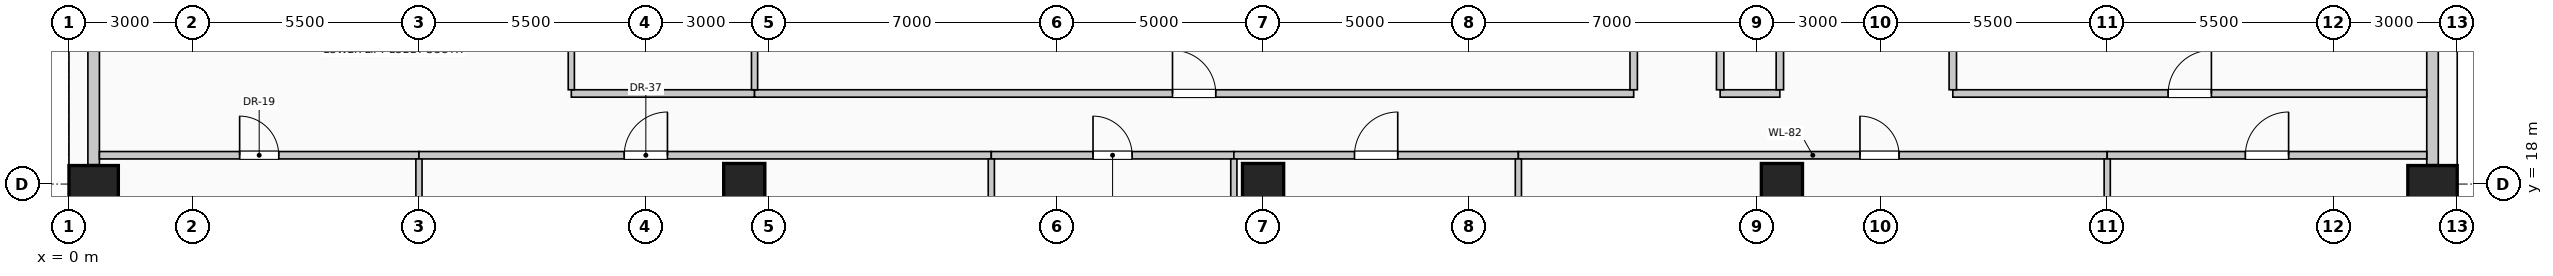
"""IFC4 building model, lengths in metres.
Left out: names, types, materials, properties, quantities, classifications, styles, units other than length and angle.
Written with IfcOpenShell. Run it as: python <this file> out.ifc"""

import sys

from ifc_helpers import new_model, si_unit, direction, frame, frame_2d, origin, origin_2d, place, context, subcontext, project, spatial, rectangle, circle, extrude, element, fill, save


model = new_model("IFC4")
c1 = context("Model", 3, precision=1e-05, world=origin(), true_north=direction((0.0, 1.0)))
c2 = subcontext(c1, "Body", "Model", "MODEL_VIEW")
j1 = project(units=[si_unit("LENGTHUNIT", "METRE"), si_unit("PLANEANGLEUNIT", "RADIAN")], contexts=[c1])
p1 = place(None, origin())
s1 = spatial("IfcSite", under=j1, at=p1, CompositionType="ELEMENT")
p2 = place(p1, origin())
s2 = spatial("IfcBuilding", under=s1, at=p2, CompositionType="ELEMENT")
p3 = place(p2, frame((0.0, 0.0, 70.6)))
s3 = spatial("IfcBuildingStorey", under=s2, at=p3, CompositionType="ELEMENT", Elevation=70.6)
for number, where, z_axis, x_axis in (
    (1, (0.6, 18.0, 0.0), (0.0, 0.0, 1.0), (0.0, 1.0, 0.0)),
    (2, (57.4, 18.0, 0.0), (0.0, 0.0, 1.0), (0.0, 1.0, 0.0)),
):
    element("IfcColumn", number, at=place(p3, frame(where, z_axis=z_axis, x_axis=x_axis)), inside=s3, PredefinedType="COLUMN", context=c2, shape_type="SweptSolid", body=[
        extrude(rectangle(XDim=0.9, YDim=1.2, at=origin_2d()), origin(), (0.0, 0.0, 1.0), 4.0),
    ])
for number, where, z_axis, x_axis in (
    (3, (16.4, 18.0, 0.0), (0.0, 0.0, 1.0), (1.0, 0.0, 0.0)),
    (4, (29.0, 18.0, 0.0), (0.0, 0.0, 1.0), (1.0, 0.0, 0.0)),
    (5, (41.6, 18.0, 0.0), (0.0, 0.0, 1.0), (1.0, 0.0, 0.0)),
):
    element("IfcColumn", number, at=place(p3, frame(where, z_axis=z_axis, x_axis=x_axis)), inside=s3, PredefinedType="COLUMN", context=c2, shape_type="SweptSolid", body=[
        extrude(circle(Radius=0.5, at=origin_2d()), origin(), (0.0, 0.0, 1.0), 4.0),
    ])
for number, where, z_axis, x_axis in (
    (6, (0.6, 18.47, 0.0), (0.0, 0.0, 1.0), (0.0, 1.0, 0.0)),
    (7, (57.4, 25.53, 0.0), (0.0, 0.0, 1.0), (0.0, -1.0, 0.0)),
):
    element("IfcWall", number, at=place(p3, frame(where, z_axis=z_axis, x_axis=x_axis)), inside=s3, PredefinedType="SOLIDWALL", context=c2, shape_type="SweptSolid", body=[
        extrude(rectangle(XDim=7.06, YDim=0.28, at=frame_2d((3.53, 0.0))), origin(), (0.0, 0.0, 1.0), 2.85),
    ])
p4 = place(p3, frame((0.74, 18.7, 0.0), z_axis=(0.0, 0.0, 1.0), x_axis=(1.0, 0.0, 0.0)))
e8 = element("IfcWall", 8, at=p4, inside=s3, PredefinedType="PARTITIONING", context=c2, shape_type="SweptSolid", body=[
    extrude(rectangle(XDim=7.76, YDim=0.18, at=frame_2d((3.88, 0.0))), origin(), (0.0, 0.0, 1.0), 3.7),
])
p5 = place(p4, frame((3.405, 0.0, 0.0)))
e9 = element("IfcOpeningElement", 9, at=p5, cuts=e8, PredefinedType="OPENING", context=c2, shape_type="SweptSolid", body=[
    extrude(rectangle(XDim=0.95, YDim=2.15, at=frame_2d((0.475, 1.075))), frame((0.0, 0.1, 0.0), z_axis=(0.0, -1.0, 0.0), x_axis=(1.0, 0.0, 0.0)), (0.0, 0.0, 1.0), 0.2),
])
p6 = place(p3, frame((8.5, 18.7, 0.0), z_axis=(0.0, 0.0, 1.0), x_axis=(1.0, 0.0, 0.0)))
e10 = element("IfcWall", 10, at=p6, inside=s3, PredefinedType="PARTITIONING", context=c2, shape_type="SweptSolid", body=[
    extrude(rectangle(XDim=13.9, YDim=0.18, at=frame_2d((6.95, 0.0))), origin(), (0.0, 0.0, 1.0), 3.7),
])
p7 = place(p6, frame((4.985, 0.0, 0.0)))
e11 = element("IfcOpeningElement", 11, at=p7, cuts=e10, PredefinedType="OPENING", context=c2, shape_type="SweptSolid", body=[
    extrude(rectangle(XDim=1.05, YDim=2.15, at=frame_2d((0.525, 1.075))), frame((0.0, 0.1, 0.0), z_axis=(0.0, -1.0, 0.0), x_axis=(1.0, 0.0, 0.0)), (0.0, 0.0, 1.0), 0.2),
])
p8 = place(p3, frame((22.4, 18.7, 0.0), z_axis=(0.0, 0.0, 1.0), x_axis=(1.0, 0.0, 0.0)))
e12 = element("IfcWall", 12, at=p8, inside=s3, PredefinedType="PARTITIONING", context=c2, shape_type="SweptSolid", body=[
    extrude(rectangle(XDim=5.89, YDim=0.18, at=frame_2d((2.945, 0.0))), origin(), (0.0, 0.0, 1.0), 3.7),
])
p9 = place(p8, frame((2.47, 0.0, 0.0)))
e13 = element("IfcOpeningElement", 13, at=p9, cuts=e12, PredefinedType="OPENING", context=c2, shape_type="SweptSolid", body=[
    extrude(rectangle(XDim=0.95, YDim=2.15, at=frame_2d((0.475, 1.075))), frame((0.0, 0.1, 0.0), z_axis=(0.0, -1.0, 0.0), x_axis=(1.0, 0.0, 0.0)), (0.0, 0.0, 1.0), 0.2),
])
p10 = place(p3, frame((28.29, 18.7, 0.0), z_axis=(0.0, 0.0, 1.0), x_axis=(1.0, 0.0, 0.0)))
e14 = element("IfcWall", 14, at=p10, inside=s3, PredefinedType="PARTITIONING", context=c2, shape_type="SweptSolid", body=[
    extrude(rectangle(XDim=6.91, YDim=0.18, at=frame_2d((3.455, 0.0))), origin(), (0.0, 0.0, 1.0), 3.7),
])
p11 = place(p10, frame((2.93, 0.0, 0.0)))
e15 = element("IfcOpeningElement", 15, at=p11, cuts=e14, PredefinedType="OPENING", context=c2, shape_type="SweptSolid", body=[
    extrude(rectangle(XDim=1.05, YDim=2.15, at=frame_2d((0.525, 1.075))), frame((0.0, 0.1, 0.0), z_axis=(0.0, -1.0, 0.0), x_axis=(1.0, 0.0, 0.0)), (0.0, 0.0, 1.0), 0.2),
])
p12 = place(p3, frame((35.2, 18.7, 0.0), z_axis=(0.0, 0.0, 1.0), x_axis=(1.0, 0.0, 0.0)))
e16 = element("IfcWall", 16, at=p12, inside=s3, PredefinedType="PARTITIONING", context=c2, shape_type="SweptSolid", body=[
    extrude(rectangle(XDim=14.3, YDim=0.18, at=frame_2d((7.15, 0.0))), origin(), (0.0, 0.0, 1.0), 3.7),
])
p13 = place(p12, frame((8.295, 0.0, 0.0)))
e17 = element("IfcOpeningElement", 17, at=p13, cuts=e16, PredefinedType="OPENING", context=c2, shape_type="SweptSolid", body=[
    extrude(rectangle(XDim=0.95, YDim=2.15, at=frame_2d((0.475, 1.075))), frame((0.0, 0.1, 0.0), z_axis=(0.0, -1.0, 0.0), x_axis=(1.0, 0.0, 0.0)), (0.0, 0.0, 1.0), 0.2),
])
p14 = place(p3, frame((49.5, 18.7, 0.0), z_axis=(0.0, 0.0, 1.0), x_axis=(1.0, 0.0, 0.0)))
e18 = element("IfcWall", 18, at=p14, inside=s3, PredefinedType="PARTITIONING", context=c2, shape_type="SweptSolid", body=[
    extrude(rectangle(XDim=7.76, YDim=0.18, at=frame_2d((3.88, 0.0))), origin(), (0.0, 0.0, 1.0), 3.7),
])
p15 = place(p14, frame((3.355, 0.0, 0.0)))
e19 = element("IfcOpeningElement", 19, at=p15, cuts=e18, PredefinedType="OPENING", context=c2, shape_type="SweptSolid", body=[
    extrude(rectangle(XDim=1.05, YDim=2.15, at=frame_2d((0.525, 1.075))), frame((0.0, 0.1, 0.0), z_axis=(0.0, -1.0, 0.0), x_axis=(1.0, 0.0, 0.0)), (0.0, 0.0, 1.0), 0.2),
])
p16 = place(p3, frame((12.2, 20.2, 0.0), z_axis=(0.0, 0.0, 1.0), x_axis=(1.0, 0.0, 0.0)))
e20 = element("IfcWall", 20, at=p16, inside=s3, PredefinedType="PARTITIONING", context=c2, shape_type="SweptSolid", body=[
    extrude(rectangle(XDim=4.45, YDim=0.18, at=frame_2d((2.225, 0.0))), origin(), (0.0, 0.0, 1.0), 3.7),
])
p17 = place(p3, frame((16.65, 20.2, 0.0), z_axis=(0.0, 0.0, 1.0), x_axis=(1.0, 0.0, 0.0)))
e21 = element("IfcWall", 21, at=p17, inside=s3, PredefinedType="PARTITIONING", context=c2, shape_type="SweptSolid", body=[
    extrude(rectangle(XDim=21.35, YDim=0.18, at=frame_2d((10.675, 0.0))), origin(), (0.0, 0.0, 1.0), 3.7),
])
p18 = place(p17, frame((10.15, 0.0, 0.0)))
e22 = element("IfcOpeningElement", 22, at=p18, cuts=e21, PredefinedType="OPENING", context=c2, shape_type="SweptSolid", body=[
    extrude(rectangle(XDim=1.05, YDim=2.15, at=frame_2d((0.525, 1.075))), frame((0.0, 0.1, 0.0), z_axis=(0.0, -1.0, 0.0), x_axis=(1.0, 0.0, 0.0)), (0.0, 0.0, 1.0), 0.2),
])
p19 = place(p3, frame((40.1, 20.2, 0.0), z_axis=(0.0, 0.0, 1.0), x_axis=(1.0, 0.0, 0.0)))
e23 = element("IfcWall", 23, at=p19, inside=s3, PredefinedType="PARTITIONING", context=c2, shape_type="SweptSolid", body=[
    extrude(rectangle(XDim=1.45, YDim=0.18, at=frame_2d((0.725, 0.0))), origin(), (0.0, 0.0, 1.0), 3.7),
])
p20 = place(p3, frame((45.75, 20.2, 0.0), z_axis=(0.0, 0.0, 1.0), x_axis=(1.0, 0.0, 0.0)))
e24 = element("IfcWall", 24, at=p20, inside=s3, PredefinedType="PARTITIONING", context=c2, shape_type="SweptSolid", body=[
    extrude(rectangle(XDim=11.51, YDim=0.18, at=frame_2d((5.755, 0.0))), origin(), (0.0, 0.0, 1.0), 3.7),
])
p21 = place(p20, frame((5.23, 0.0, 0.0)))
e25 = element("IfcOpeningElement", 25, at=p21, cuts=e24, PredefinedType="OPENING", context=c2, shape_type="SweptSolid", body=[
    extrude(rectangle(XDim=1.05, YDim=2.15, at=frame_2d((0.525, 1.075))), frame((0.0, 0.1, 0.0), z_axis=(0.0, -1.0, 0.0), x_axis=(1.0, 0.0, 0.0)), (0.0, 0.0, 1.0), 0.2),
])
p22 = place(p3, frame((8.5, 1.2, 0.0), z_axis=(0.0, 0.0, 1.0), x_axis=(0.0, 1.0, 0.0)))
e26 = element("IfcWall", 26, at=p22, inside=s3, PredefinedType="PARTITIONING", context=c2, shape_type="SweptSolid", body=[
    extrude(rectangle(XDim=17.41, YDim=0.15, at=frame_2d((8.705, 0.0))), origin(), (0.0, 0.0, 1.0), 3.7),
])
p23 = place(p3, frame((12.2, 20.29, 0.0), z_axis=(0.0, 0.0, 1.0), x_axis=(0.0, 1.0, 0.0)))
e27 = element("IfcWall", 27, at=p23, inside=s3, PredefinedType="PARTITIONING", context=c2, shape_type="SweptSolid", body=[
    extrude(rectangle(XDim=1.81, YDim=0.15, at=frame_2d((0.905, 0.0))), origin(), (0.0, 0.0, 1.0), 3.7),
])
p24 = place(p3, frame((16.65, 20.29, 0.0), z_axis=(0.0, 0.0, 1.0), x_axis=(0.0, 1.0, 0.0)))
e28 = element("IfcWall", 28, at=p24, inside=s3, PredefinedType="PARTITIONING", context=c2, shape_type="SweptSolid", body=[
    extrude(rectangle(XDim=7.835, YDim=0.15, at=frame_2d((3.917, 0.0))), origin(), (0.0, 0.0, 1.0), 2.995),
])
for number, where, z_axis, x_axis in (
    (29, (22.4, 0.74, 0.0), (0.0, 0.0, 1.0), (0.0, 1.0, 0.0)),
    (30, (28.29, 0.74, 0.0), (0.0, 0.0, 1.0), (0.0, 1.0, 0.0)),
    (31, (35.2, 0.74, 0.0), (0.0, 0.0, 1.0), (0.0, 1.0, 0.0)),
):
    element("IfcWall", number, at=place(p3, frame(where, z_axis=z_axis, x_axis=x_axis)), inside=s3, PredefinedType="PARTITIONING", context=c2, shape_type="SweptSolid", body=[
        extrude(rectangle(XDim=17.87, YDim=0.15, at=frame_2d((8.935, 0.0))), origin(), (0.0, 0.0, 1.0), 3.7),
    ])
p25 = place(p3, frame((38.0, 20.29, 0.0), z_axis=(0.0, 0.0, 1.0), x_axis=(0.0, 1.0, 0.0)))
e32 = element("IfcWall", 32, at=p25, inside=s3, PredefinedType="PARTITIONING", context=c2, shape_type="SweptSolid", body=[
    extrude(rectangle(XDim=7.835, YDim=0.18, at=frame_2d((3.917, 0.0))), origin(), (0.0, 0.0, 1.0), 3.7),
])
p26 = place(p3, frame((40.1, 20.29, 0.0), z_axis=(0.0, 0.0, 1.0), x_axis=(0.0, 1.0, 0.0)))
e33 = element("IfcWall", 33, at=p26, inside=s3, PredefinedType="PARTITIONING", context=c2, shape_type="SweptSolid", body=[
    extrude(rectangle(XDim=9.82, YDim=0.18, at=frame_2d((4.91, 0.0))), origin(), (0.0, 0.0, 1.0), 3.7),
])
p27 = place(p3, frame((41.55, 20.29, 0.0), z_axis=(0.0, 0.0, 1.0), x_axis=(0.0, 1.0, 0.0)))
e34 = element("IfcWall", 34, at=p27, inside=s3, PredefinedType="PARTITIONING", context=c2, shape_type="SweptSolid", body=[
    extrude(rectangle(XDim=9.835, YDim=0.18, at=frame_2d((4.917, 0.0))), origin(), (0.0, 0.0, 1.0), 2.995),
])
p28 = place(p3, frame((45.75, 20.29, 0.0), z_axis=(0.0, 0.0, 1.0), x_axis=(0.0, 1.0, 0.0)))
e35 = element("IfcWall", 35, at=p28, inside=s3, PredefinedType="PARTITIONING", context=c2, shape_type="SweptSolid", body=[
    extrude(rectangle(XDim=11.985, YDim=0.18, at=frame_2d((5.992, 0.0))), origin(), (0.0, 0.0, 1.0), 3.7),
])
p29 = place(p3, frame((49.5, 1.2, 0.0), z_axis=(0.0, 0.0, 1.0), x_axis=(0.0, 1.0, 0.0)))
e36 = element("IfcWall", 36, at=p29, inside=s3, PredefinedType="PARTITIONING", context=c2, shape_type="SweptSolid", body=[
    extrude(rectangle(XDim=17.41, YDim=0.15, at=frame_2d((8.705, 0.0))), origin(), (0.0, 0.0, 1.0), 3.7),
])
p30 = place(p5, origin())
e37 = element("IfcDoor", 37, at=p30, inside=s3, OperationType="SINGLE_SWING_LEFT", PredefinedType="DOOR", context=c2, shape_type="SweptSolid", body=[
    extrude(rectangle(XDim=0.95, YDim=2.15, at=frame_2d((0.475, 1.075))), frame((0.0, 0.025, 0.0), z_axis=(0.0, -1.0, 0.0), x_axis=(1.0, 0.0, 0.0)), (0.0, 0.0, 1.0), 0.05),
])
fill(e9, e37)
p31 = place(p7, origin())
e38 = element("IfcDoor", 38, at=p31, inside=s3, OperationType="SINGLE_SWING_RIGHT", PredefinedType="DOOR", context=c2, shape_type="SweptSolid", body=[
    extrude(rectangle(XDim=1.05, YDim=2.15, at=frame_2d((0.525, 1.075))), frame((0.0, 0.025, 0.0), z_axis=(0.0, -1.0, 0.0), x_axis=(1.0, 0.0, 0.0)), (0.0, 0.0, 1.0), 0.05),
])
fill(e11, e38)
p32 = place(p9, origin())
e39 = element("IfcDoor", 39, at=p32, inside=s3, OperationType="SINGLE_SWING_LEFT", PredefinedType="DOOR", context=c2, shape_type="SweptSolid", body=[
    extrude(rectangle(XDim=0.95, YDim=2.15, at=frame_2d((0.475, 1.075))), frame((0.0, 0.025, 0.0), z_axis=(0.0, -1.0, 0.0), x_axis=(1.0, 0.0, 0.0)), (0.0, 0.0, 1.0), 0.05),
])
fill(e13, e39)
p33 = place(p11, origin())
e40 = element("IfcDoor", 40, at=p33, inside=s3, OperationType="SINGLE_SWING_RIGHT", PredefinedType="DOOR", context=c2, shape_type="SweptSolid", body=[
    extrude(rectangle(XDim=1.05, YDim=2.15, at=frame_2d((0.525, 1.075))), frame((0.0, 0.025, 0.0), z_axis=(0.0, -1.0, 0.0), x_axis=(1.0, 0.0, 0.0)), (0.0, 0.0, 1.0), 0.05),
])
fill(e15, e40)
p34 = place(p13, origin())
e41 = element("IfcDoor", 41, at=p34, inside=s3, OperationType="SINGLE_SWING_LEFT", PredefinedType="DOOR", context=c2, shape_type="SweptSolid", body=[
    extrude(rectangle(XDim=0.95, YDim=2.15, at=frame_2d((0.475, 1.075))), frame((0.0, 0.025, 0.0), z_axis=(0.0, -1.0, 0.0), x_axis=(1.0, 0.0, 0.0)), (0.0, 0.0, 1.0), 0.05),
])
fill(e17, e41)
p35 = place(p15, origin())
e42 = element("IfcDoor", 42, at=p35, inside=s3, OperationType="SINGLE_SWING_RIGHT", PredefinedType="DOOR", context=c2, shape_type="SweptSolid", body=[
    extrude(rectangle(XDim=1.05, YDim=2.15, at=frame_2d((0.525, 1.075))), frame((0.0, 0.025, 0.0), z_axis=(0.0, -1.0, 0.0), x_axis=(1.0, 0.0, 0.0)), (0.0, 0.0, 1.0), 0.05),
])
fill(e19, e42)
p36 = place(p18, origin())
e43 = element("IfcDoor", 43, at=p36, inside=s3, OperationType="SINGLE_SWING_LEFT", PredefinedType="DOOR", context=c2, shape_type="SweptSolid", body=[
    extrude(rectangle(XDim=1.05, YDim=2.15, at=frame_2d((0.525, 1.075))), frame((0.0, 0.025, 0.0), z_axis=(0.0, -1.0, 0.0), x_axis=(1.0, 0.0, 0.0)), (0.0, 0.0, 1.0), 0.05),
])
fill(e22, e43)
p37 = place(p21, origin())
e44 = element("IfcDoor", 44, at=p37, inside=s3, OperationType="SINGLE_SWING_RIGHT", PredefinedType="DOOR", context=c2, shape_type="SweptSolid", body=[
    extrude(rectangle(XDim=1.05, YDim=2.15, at=frame_2d((0.525, 1.075))), frame((0.0, 0.025, 0.0), z_axis=(0.0, -1.0, 0.0), x_axis=(1.0, 0.0, 0.0)), (0.0, 0.0, 1.0), 0.05),
])
fill(e25, e44)
save(model, sys.argv[1])
